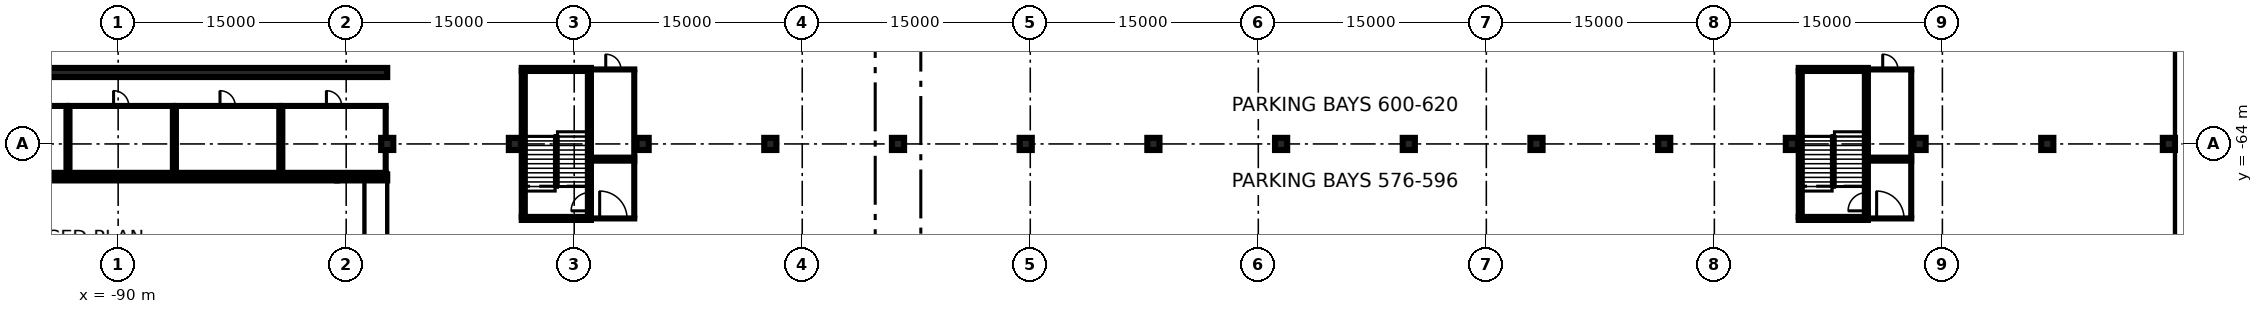
"""IFC4 building model, lengths in metres.
Left out: names, types, materials, properties, quantities, classifications, styles, units other than length and angle.
Written with IfcOpenShell. Run it as: python <this file> out.ifc"""

import sys

from ifc_helpers import new_model, si_unit, direction, frame, frame_2d, origin, origin_2d, place, context, subcontext, project, spatial, rectangle, extrude, element, fill, save


model = new_model("IFC4")
c1 = context("Model", 3, precision=1e-05, world=origin(), true_north=direction((0.0, 1.0)))
c2 = subcontext(c1, "Body", "Model", "MODEL_VIEW")
j1 = project(units=[si_unit("LENGTHUNIT", "METRE"), si_unit("PLANEANGLEUNIT", "RADIAN")], contexts=[c1])
p1 = place(None, origin())
s1 = spatial("IfcSite", under=j1, at=p1, CompositionType="ELEMENT")
p2 = place(p1, origin())
s2 = spatial("IfcBuilding", under=s1, at=p2, CompositionType="ELEMENT")
p3 = place(p2, frame((0.0, 0.0, -12.0)))
s3 = spatial("IfcBuildingStorey", under=s2, at=p3, CompositionType="ELEMENT", Elevation=-12.0)
p4 = place(p3, frame((45.75, -80.0, 0.0), z_axis=(0.0, 0.0, 1.0), x_axis=(0.0, 1.0, 0.0)))
e1 = element("IfcWall", 1, at=p4, inside=s3, PredefinedType="USERDEFINED", context=c2, shape_type="SweptSolid", body=[
    extrude(rectangle(XDim=160.0, YDim=0.9, at=frame_2d((80.0, 0.0))), origin(), (0.0, 0.0, 1.0), 11.55),
])
p5 = place(p2, frame((0.0, 0.0, -7.2)))
s4 = spatial("IfcBuildingStorey", under=s2, at=p5, CompositionType="ELEMENT", Elevation=-7.2)
for number, where, z_axis, x_axis in (
    (2, (-72.3, -64.0, -0.4), (0.0, 0.0, 1.0), (1.0, 0.0, 0.0)),
    (3, (-63.9, -64.0, -0.4), (0.0, 0.0, 1.0), (1.0, 0.0, 0.0)),
    (4, (-55.5, -64.0, -0.4), (0.0, 0.0, 1.0), (1.0, 0.0, 0.0)),
    (5, (-47.1, -64.0, -0.4), (0.0, 0.0, 1.0), (1.0, 0.0, 0.0)),
    (6, (-38.7, -64.0, -0.4), (0.0, 0.0, 1.0), (1.0, 0.0, 0.0)),
    (7, (-30.3, -64.0, -0.4), (0.0, 0.0, 1.0), (1.0, 0.0, 0.0)),
    (8, (-21.9, -64.0, -0.4), (0.0, 0.0, 1.0), (1.0, 0.0, 0.0)),
    (9, (-13.5, -64.0, -0.4), (0.0, 0.0, 1.0), (1.0, 0.0, 0.0)),
    (10, (-5.1, -64.0, -0.4), (0.0, 0.0, 1.0), (1.0, 0.0, 0.0)),
    (11, (3.3, -64.0, -0.4), (0.0, 0.0, 1.0), (1.0, 0.0, 0.0)),
    (12, (11.7, -64.0, -0.4), (0.0, 0.0, 1.0), (1.0, 0.0, 0.0)),
    (13, (20.1, -64.0, -0.4), (0.0, 0.0, 1.0), (1.0, 0.0, 0.0)),
    (14, (28.5, -64.0, -0.4), (0.0, 0.0, 1.0), (1.0, 0.0, 0.0)),
    (15, (36.9, -64.0, -0.4), (0.0, 0.0, 1.0), (1.0, 0.0, 0.0)),
    (16, (44.9, -64.0, -0.4), (0.0, 0.0, 1.0), (1.0, 0.0, 0.0)),
):
    element("IfcColumn", number, at=place(p5, frame(where, z_axis=z_axis, x_axis=x_axis)), inside=s4, PredefinedType="COLUMN", context=c2, shape_type="SweptSolid", body=[
        extrude(rectangle(XDim=0.8, YDim=0.8, at=origin_2d()), origin(), (0.0, 0.0, 1.0), 3.6),
    ])
p6 = place(p5, frame((-100.3, -65.9, 0.0), z_axis=(0.0, 0.0, 1.0), x_axis=(1.0, 0.0, 0.0)))
e17 = element("IfcWall", 17, at=p6, inside=s4, PredefinedType="PARTITIONING", context=c2, shape_type="SweptSolid", body=[
    extrude(rectangle(XDim=7.0, YDim=0.2, at=frame_2d((3.5, 0.0))), origin(), (0.0, 0.0, 1.0), 3.2),
])
p7 = place(p5, frame((-100.3, -61.5, 0.0), z_axis=(0.0, 0.0, 1.0), x_axis=(1.0, 0.0, 0.0)))
e18 = element("IfcWall", 18, at=p7, inside=s4, PredefinedType="PARTITIONING", context=c2, shape_type="SweptSolid", body=[
    extrude(rectangle(XDim=7.0, YDim=0.2, at=frame_2d((3.5, 0.0))), origin(), (0.0, 0.0, 1.0), 3.2),
])
p8 = place(p7, frame((2.6, 0.0, 0.0)))
e19 = element("IfcOpeningElement", 19, at=p8, cuts=e18, PredefinedType="OPENING", context=c2, shape_type="SweptSolid", body=[
    extrude(rectangle(XDim=1.8, YDim=2.1, at=frame_2d((0.9, 1.05))), frame((0.0, 0.11, 0.0), z_axis=(0.0, -1.0, 0.0), x_axis=(1.0, 0.0, 0.0)), (0.0, 0.0, 1.0), 0.22),
])
p9 = place(p5, frame((-93.4, -65.8, 0.0), z_axis=(0.0, 0.0, 1.0), x_axis=(0.0, 1.0, 0.0)))
e20 = element("IfcWall", 20, at=p9, inside=s4, PredefinedType="PARTITIONING", context=c2, shape_type="SweptSolid", body=[
    extrude(rectangle(XDim=4.2, YDim=0.2, at=frame_2d((2.1, 0.0))), origin(), (0.0, 0.0, 1.0), 3.2),
])
p10 = place(p5, frame((-93.3, -65.9, 0.0), z_axis=(0.0, 0.0, 1.0), x_axis=(1.0, 0.0, 0.0)))
e21 = element("IfcWall", 21, at=p10, inside=s4, PredefinedType="PARTITIONING", context=c2, shape_type="SweptSolid", body=[
    extrude(rectangle(XDim=7.0, YDim=0.2, at=frame_2d((3.5, 0.0))), origin(), (0.0, 0.0, 1.0), 3.2),
])
p11 = place(p5, frame((-93.3, -61.5, 0.0), z_axis=(0.0, 0.0, 1.0), x_axis=(1.0, 0.0, 0.0)))
e22 = element("IfcWall", 22, at=p11, inside=s4, PredefinedType="PARTITIONING", context=c2, shape_type="SweptSolid", body=[
    extrude(rectangle(XDim=7.0, YDim=0.2, at=frame_2d((3.5, 0.0))), origin(), (0.0, 0.0, 1.0), 3.2),
])
p12 = place(p11, frame((3.0, 0.0, 0.0)))
e23 = element("IfcOpeningElement", 23, at=p12, cuts=e22, PredefinedType="OPENING", context=c2, shape_type="SweptSolid", body=[
    extrude(rectangle(XDim=1.0, YDim=2.1, at=frame_2d((0.5, 1.05))), frame((0.0, 0.11, 0.0), z_axis=(0.0, -1.0, 0.0), x_axis=(1.0, 0.0, 0.0)), (0.0, 0.0, 1.0), 0.22),
])
for number, where, z_axis, x_axis in (
    (24, (-93.2, -65.8, 0.0), (0.0, 0.0, 1.0), (0.0, 1.0, 0.0)),
    (25, (-86.4, -65.8, 0.0), (0.0, 0.0, 1.0), (0.0, 1.0, 0.0)),
):
    element("IfcWall", number, at=place(p5, frame(where, z_axis=z_axis, x_axis=x_axis)), inside=s4, PredefinedType="PARTITIONING", context=c2, shape_type="SweptSolid", body=[
        extrude(rectangle(XDim=4.2, YDim=0.2, at=frame_2d((2.1, 0.0))), origin(), (0.0, 0.0, 1.0), 3.2),
    ])
p13 = place(p5, frame((-86.3, -65.9, 0.0), z_axis=(0.0, 0.0, 1.0), x_axis=(1.0, 0.0, 0.0)))
e26 = element("IfcWall", 26, at=p13, inside=s4, PredefinedType="PARTITIONING", context=c2, shape_type="SweptSolid", body=[
    extrude(rectangle(XDim=7.0, YDim=0.2, at=frame_2d((3.5, 0.0))), origin(), (0.0, 0.0, 1.0), 3.2),
])
p14 = place(p5, frame((-86.3, -61.5, 0.0), z_axis=(0.0, 0.0, 1.0), x_axis=(1.0, 0.0, 0.0)))
e27 = element("IfcWall", 27, at=p14, inside=s4, PredefinedType="PARTITIONING", context=c2, shape_type="SweptSolid", body=[
    extrude(rectangle(XDim=7.0, YDim=0.2, at=frame_2d((3.5, 0.0))), origin(), (0.0, 0.0, 1.0), 3.2),
])
p15 = place(p14, frame((3.0, 0.0, 0.0)))
e28 = element("IfcOpeningElement", 28, at=p15, cuts=e27, PredefinedType="OPENING", context=c2, shape_type="SweptSolid", body=[
    extrude(rectangle(XDim=1.0, YDim=2.1, at=frame_2d((0.5, 1.05))), frame((0.0, 0.11, 0.0), z_axis=(0.0, -1.0, 0.0), x_axis=(1.0, 0.0, 0.0)), (0.0, 0.0, 1.0), 0.22),
])
for number, where, z_axis, x_axis in (
    (29, (-86.2, -65.8, 0.0), (0.0, 0.0, 1.0), (0.0, 1.0, 0.0)),
    (30, (-79.4, -65.8, 0.0), (0.0, 0.0, 1.0), (0.0, 1.0, 0.0)),
):
    element("IfcWall", number, at=place(p5, frame(where, z_axis=z_axis, x_axis=x_axis)), inside=s4, PredefinedType="PARTITIONING", context=c2, shape_type="SweptSolid", body=[
        extrude(rectangle(XDim=4.2, YDim=0.2, at=frame_2d((2.1, 0.0))), origin(), (0.0, 0.0, 1.0), 3.2),
    ])
p16 = place(p5, frame((-79.3, -65.9, 0.0), z_axis=(0.0, 0.0, 1.0), x_axis=(1.0, 0.0, 0.0)))
e31 = element("IfcWall", 31, at=p16, inside=s4, PredefinedType="PARTITIONING", context=c2, shape_type="SweptSolid", body=[
    extrude(rectangle(XDim=7.0, YDim=0.2, at=frame_2d((3.5, 0.0))), origin(), (0.0, 0.0, 1.0), 3.2),
])
p17 = place(p5, frame((-79.3, -61.5, 0.0), z_axis=(0.0, 0.0, 1.0), x_axis=(1.0, 0.0, 0.0)))
e32 = element("IfcWall", 32, at=p17, inside=s4, PredefinedType="PARTITIONING", context=c2, shape_type="SweptSolid", body=[
    extrude(rectangle(XDim=7.0, YDim=0.2, at=frame_2d((3.5, 0.0))), origin(), (0.0, 0.0, 1.0), 3.2),
])
p18 = place(p17, frame((3.0, 0.0, 0.0)))
e33 = element("IfcOpeningElement", 33, at=p18, cuts=e32, PredefinedType="OPENING", context=c2, shape_type="SweptSolid", body=[
    extrude(rectangle(XDim=1.0, YDim=2.1, at=frame_2d((0.5, 1.05))), frame((0.0, 0.11, 0.0), z_axis=(0.0, -1.0, 0.0), x_axis=(1.0, 0.0, 0.0)), (0.0, 0.0, 1.0), 0.22),
])
p19 = place(p5, frame((-79.2, -65.8, 0.0), z_axis=(0.0, 0.0, 1.0), x_axis=(0.0, 1.0, 0.0)))
e34 = element("IfcWall", 34, at=p19, inside=s4, PredefinedType="PARTITIONING", context=c2, shape_type="SweptSolid", body=[
    extrude(rectangle(XDim=4.2, YDim=0.2, at=frame_2d((2.1, 0.0))), origin(), (0.0, 0.0, 1.0), 3.2),
])
p20 = place(p5, frame((-72.4, -65.8, 0.0), z_axis=(0.0, 0.0, 1.0), x_axis=(0.0, 1.0, 0.0)))
e35 = element("IfcWall", 35, at=p20, inside=s4, PredefinedType="PARTITIONING", context=c2, shape_type="SweptSolid", body=[
    extrude(rectangle(XDim=1.4, YDim=0.2, at=frame_2d((0.7, 0.0))), origin(), (0.0, 0.0, 1.0), 3.2),
])
p21 = place(p5, frame((-72.4, -63.6, 0.0), z_axis=(0.0, 0.0, 1.0), x_axis=(0.0, 1.0, 0.0)))
e36 = element("IfcWall", 36, at=p21, inside=s4, PredefinedType="PARTITIONING", context=c2, shape_type="SweptSolid", body=[
    extrude(rectangle(XDim=2.0, YDim=0.2, at=frame_2d((1.0, 0.0))), origin(), (0.0, 0.0, 1.0), 3.2),
])
p22 = place(p5, frame((-58.9, -68.9, 0.0), z_axis=(0.0, 0.0, 1.0), x_axis=(1.0, 0.0, 0.0)))
e37 = element("IfcWall", 37, at=p22, inside=s4, PredefinedType="PARTITIONING", context=c2, shape_type="SweptSolid", body=[
    extrude(rectangle(XDim=2.95, YDim=0.2, at=frame_2d((1.475, 0.0))), origin(), (0.0, 0.0, 1.0), 3.2),
])
p23 = place(p22, frame((0.575, 0.0, 0.0)))
e38 = element("IfcOpeningElement", 38, at=p23, cuts=e37, PredefinedType="OPENING", context=c2, shape_type="SweptSolid", body=[
    extrude(rectangle(XDim=1.8, YDim=2.1, at=frame_2d((0.9, 1.05))), frame((0.0, 0.11, 0.0), z_axis=(0.0, -1.0, 0.0), x_axis=(1.0, 0.0, 0.0)), (0.0, 0.0, 1.0), 0.22),
])
p24 = place(p5, frame((-58.9, -65.1, 0.0), z_axis=(0.0, 0.0, 1.0), x_axis=(1.0, 0.0, 0.0)))
e39 = element("IfcWall", 39, at=p24, inside=s4, PredefinedType="PARTITIONING", context=c2, shape_type="SweptSolid", body=[
    extrude(rectangle(XDim=2.95, YDim=0.2, at=frame_2d((1.475, 0.0))), origin(), (0.0, 0.0, 1.0), 3.2),
])
p25 = place(p5, frame((-56.05, -68.8, 0.0), z_axis=(0.0, 0.0, 1.0), x_axis=(0.0, 1.0, 0.0)))
e40 = element("IfcWall", 40, at=p25, inside=s4, PredefinedType="PARTITIONING", context=c2, shape_type="SweptSolid", body=[
    extrude(rectangle(XDim=3.6, YDim=0.2, at=frame_2d((1.8, 0.0))), origin(), (0.0, 0.0, 1.0), 3.2),
])
p26 = place(p5, frame((-58.9, -64.9, 0.0), z_axis=(0.0, 0.0, 1.0), x_axis=(1.0, 0.0, 0.0)))
e41 = element("IfcWall", 41, at=p26, inside=s4, PredefinedType="PARTITIONING", context=c2, shape_type="SweptSolid", body=[
    extrude(rectangle(XDim=2.95, YDim=0.2, at=frame_2d((1.475, 0.0))), origin(), (0.0, 0.0, 1.0), 3.2),
])
p27 = place(p5, frame((-58.9, -59.1, 0.0), z_axis=(0.0, 0.0, 1.0), x_axis=(1.0, 0.0, 0.0)))
e42 = element("IfcWall", 42, at=p27, inside=s4, PredefinedType="PARTITIONING", context=c2, shape_type="SweptSolid", body=[
    extrude(rectangle(XDim=2.95, YDim=0.2, at=frame_2d((1.475, 0.0))), origin(), (0.0, 0.0, 1.0), 3.2),
])
p28 = place(p27, frame((0.975, 0.0, 0.0)))
e43 = element("IfcOpeningElement", 43, at=p28, cuts=e42, PredefinedType="OPENING", context=c2, shape_type="SweptSolid", body=[
    extrude(rectangle(XDim=1.0, YDim=2.1, at=frame_2d((0.5, 1.05))), frame((0.0, 0.11, 0.0), z_axis=(0.0, -1.0, 0.0), x_axis=(1.0, 0.0, 0.0)), (0.0, 0.0, 1.0), 0.22),
])
p29 = place(p5, frame((-56.05, -64.8, 0.0), z_axis=(0.0, 0.0, 1.0), x_axis=(0.0, 1.0, 0.0)))
e44 = element("IfcWall", 44, at=p29, inside=s4, PredefinedType="PARTITIONING", context=c2, shape_type="SweptSolid", body=[
    extrude(rectangle(XDim=5.6, YDim=0.2, at=frame_2d((2.8, 0.0))), origin(), (0.0, 0.0, 1.0), 3.2),
])
p30 = place(p5, frame((25.1, -68.9, 0.0), z_axis=(0.0, 0.0, 1.0), x_axis=(1.0, 0.0, 0.0)))
e45 = element("IfcWall", 45, at=p30, inside=s4, PredefinedType="PARTITIONING", context=c2, shape_type="SweptSolid", body=[
    extrude(rectangle(XDim=2.95, YDim=0.2, at=frame_2d((1.475, 0.0))), origin(), (0.0, 0.0, 1.0), 3.2),
])
p31 = place(p30, frame((0.575, 0.0, 0.0)))
e46 = element("IfcOpeningElement", 46, at=p31, cuts=e45, PredefinedType="OPENING", context=c2, shape_type="SweptSolid", body=[
    extrude(rectangle(XDim=1.8, YDim=2.1, at=frame_2d((0.9, 1.05))), frame((0.0, 0.11, 0.0), z_axis=(0.0, -1.0, 0.0), x_axis=(1.0, 0.0, 0.0)), (0.0, 0.0, 1.0), 0.22),
])
p32 = place(p5, frame((25.1, -65.1, 0.0), z_axis=(0.0, 0.0, 1.0), x_axis=(1.0, 0.0, 0.0)))
e47 = element("IfcWall", 47, at=p32, inside=s4, PredefinedType="PARTITIONING", context=c2, shape_type="SweptSolid", body=[
    extrude(rectangle(XDim=2.95, YDim=0.2, at=frame_2d((1.475, 0.0))), origin(), (0.0, 0.0, 1.0), 3.2),
])
p33 = place(p5, frame((27.95, -68.8, 0.0), z_axis=(0.0, 0.0, 1.0), x_axis=(0.0, 1.0, 0.0)))
e48 = element("IfcWall", 48, at=p33, inside=s4, PredefinedType="PARTITIONING", context=c2, shape_type="SweptSolid", body=[
    extrude(rectangle(XDim=3.6, YDim=0.2, at=frame_2d((1.8, 0.0))), origin(), (0.0, 0.0, 1.0), 3.2),
])
p34 = place(p5, frame((25.1, -64.9, 0.0), z_axis=(0.0, 0.0, 1.0), x_axis=(1.0, 0.0, 0.0)))
e49 = element("IfcWall", 49, at=p34, inside=s4, PredefinedType="PARTITIONING", context=c2, shape_type="SweptSolid", body=[
    extrude(rectangle(XDim=2.95, YDim=0.2, at=frame_2d((1.475, 0.0))), origin(), (0.0, 0.0, 1.0), 3.2),
])
p35 = place(p5, frame((25.1, -59.1, 0.0), z_axis=(0.0, 0.0, 1.0), x_axis=(1.0, 0.0, 0.0)))
e50 = element("IfcWall", 50, at=p35, inside=s4, PredefinedType="PARTITIONING", context=c2, shape_type="SweptSolid", body=[
    extrude(rectangle(XDim=2.95, YDim=0.2, at=frame_2d((1.475, 0.0))), origin(), (0.0, 0.0, 1.0), 3.2),
])
p36 = place(p35, frame((0.975, 0.0, 0.0)))
e51 = element("IfcOpeningElement", 51, at=p36, cuts=e50, PredefinedType="OPENING", context=c2, shape_type="SweptSolid", body=[
    extrude(rectangle(XDim=1.0, YDim=2.1, at=frame_2d((0.5, 1.05))), frame((0.0, 0.11, 0.0), z_axis=(0.0, -1.0, 0.0), x_axis=(1.0, 0.0, 0.0)), (0.0, 0.0, 1.0), 0.22),
])
p37 = place(p5, frame((27.95, -64.8, 0.0), z_axis=(0.0, 0.0, 1.0), x_axis=(0.0, 1.0, 0.0)))
e52 = element("IfcWall", 52, at=p37, inside=s4, PredefinedType="PARTITIONING", context=c2, shape_type="SweptSolid", body=[
    extrude(rectangle(XDim=5.6, YDim=0.2, at=frame_2d((2.8, 0.0))), origin(), (0.0, 0.0, 1.0), 3.2),
])
p38 = place(p5, frame((-63.35, -68.8, 0.0), z_axis=(0.0, 0.0, 1.0), x_axis=(0.0, 1.0, 0.0)))
e53 = element("IfcWall", 53, at=p38, inside=s4, PredefinedType="SOLIDWALL", context=c2, shape_type="SweptSolid", body=[
    extrude(rectangle(XDim=9.6, YDim=0.2, at=frame_2d((4.8, 0.0))), origin(), (0.0, 0.0, 1.0), 3.2),
])
p39 = place(p5, frame((-59.0, -68.8, 0.0), z_axis=(0.0, 0.0, 1.0), x_axis=(0.0, 1.0, 0.0)))
e54 = element("IfcWall", 54, at=p39, inside=s4, PredefinedType="SOLIDWALL", context=c2, shape_type="SweptSolid", body=[
    extrude(rectangle(XDim=9.6, YDim=0.2, at=frame_2d((4.8, 0.0))), origin(), (0.0, 0.0, 1.0), 3.2),
])
p40 = place(p39, frame((0.4, 0.0, 0.0)))
e55 = element("IfcOpeningElement", 55, at=p40, cuts=e54, PredefinedType="OPENING", context=c2, shape_type="SweptSolid", body=[
    extrude(rectangle(XDim=1.2, YDim=2.1, at=frame_2d((0.6, 1.05))), frame((0.0, 0.11, 0.0), z_axis=(0.0, -1.0, 0.0), x_axis=(1.0, 0.0, 0.0)), (0.0, 0.0, 1.0), 0.22),
])
for number, where, z_axis, x_axis in (
    (56, (-58.9, -68.9, 0.0), (0.0, 0.0, 1.0), (-1.0, 0.0, 0.0)),
    (57, (-63.45, -59.1, 0.0), (0.0, 0.0, 1.0), (1.0, 0.0, 0.0)),
):
    element("IfcWall", number, at=place(p5, frame(where, z_axis=z_axis, x_axis=x_axis)), inside=s4, PredefinedType="SOLIDWALL", context=c2, shape_type="SweptSolid", body=[
        extrude(rectangle(XDim=4.55, YDim=0.2, at=frame_2d((2.275, 0.0))), origin(), (0.0, 0.0, 1.0), 3.2),
    ])
p41 = place(p5, frame((20.65, -68.8, 0.0), z_axis=(0.0, 0.0, 1.0), x_axis=(0.0, 1.0, 0.0)))
e58 = element("IfcWall", 58, at=p41, inside=s4, PredefinedType="SOLIDWALL", context=c2, shape_type="SweptSolid", body=[
    extrude(rectangle(XDim=9.6, YDim=0.2, at=frame_2d((4.8, 0.0))), origin(), (0.0, 0.0, 1.0), 3.2),
])
p42 = place(p5, frame((25.0, -68.8, 0.0), z_axis=(0.0, 0.0, 1.0), x_axis=(0.0, 1.0, 0.0)))
e59 = element("IfcWall", 59, at=p42, inside=s4, PredefinedType="SOLIDWALL", context=c2, shape_type="SweptSolid", body=[
    extrude(rectangle(XDim=9.6, YDim=0.2, at=frame_2d((4.8, 0.0))), origin(), (0.0, 0.0, 1.0), 3.2),
])
p43 = place(p42, frame((0.4, 0.0, 0.0)))
e60 = element("IfcOpeningElement", 60, at=p43, cuts=e59, PredefinedType="OPENING", context=c2, shape_type="SweptSolid", body=[
    extrude(rectangle(XDim=1.2, YDim=2.1, at=frame_2d((0.6, 1.05))), frame((0.0, 0.11, 0.0), z_axis=(0.0, -1.0, 0.0), x_axis=(1.0, 0.0, 0.0)), (0.0, 0.0, 1.0), 0.22),
])
for number, where, z_axis, x_axis in (
    (61, (25.1, -68.9, 0.0), (0.0, 0.0, 1.0), (-1.0, 0.0, 0.0)),
    (62, (20.55, -59.1, 0.0), (0.0, 0.0, 1.0), (1.0, 0.0, 0.0)),
):
    element("IfcWall", number, at=place(p5, frame(where, z_axis=z_axis, x_axis=x_axis)), inside=s4, PredefinedType="SOLIDWALL", context=c2, shape_type="SweptSolid", body=[
        extrude(rectangle(XDim=4.55, YDim=0.2, at=frame_2d((2.275, 0.0))), origin(), (0.0, 0.0, 1.0), 3.2),
    ])
p44 = place(p5, frame((-114.3, -66.2, 0.0), z_axis=(0.0, 0.0, 1.0), x_axis=(1.0, 0.0, 0.0)))
e63 = element("IfcWall", 63, at=p44, inside=s4, PredefinedType="SOLIDWALL", context=c2, shape_type="SweptSolid", body=[
    extrude(rectangle(XDim=38.7, YDim=0.4, at=frame_2d((19.35, 0.0))), origin(), (0.0, 0.0, 1.0), 3.2),
])
p45 = place(p5, frame((-75.6, -66.2, 0.0), z_axis=(0.0, 0.0, 1.0), x_axis=(1.0, 0.0, 0.0)))
e64 = element("IfcWall", 64, at=p45, inside=s4, PredefinedType="SOLIDWALL", context=c2, shape_type="SweptSolid", body=[
    extrude(rectangle(XDim=3.3, YDim=0.4, at=frame_2d((1.65, 0.0))), origin(), (0.0, 0.0, 1.0), 3.2),
])
p46 = place(p5, frame((-114.3, -59.3, 0.0), z_axis=(0.0, 0.0, 1.0), x_axis=(1.0, 0.0, 0.0)))
e65 = element("IfcWall", 65, at=p46, inside=s4, PredefinedType="SOLIDWALL", context=c2, shape_type="SweptSolid", body=[
    extrude(rectangle(XDim=42.0, YDim=0.6, at=frame_2d((21.0, 0.0))), origin(), (0.0, 0.0, 1.0), 3.2),
])
p47 = place(p12, origin())
e66 = element("IfcDoor", 66, at=p47, inside=s4, OperationType="SINGLE_SWING_LEFT", PredefinedType="DOOR", context=c2, shape_type="SweptSolid", body=[
    extrude(rectangle(XDim=1.0, YDim=2.1, at=frame_2d((0.5, 1.05))), frame((0.0, 0.025, 0.0), z_axis=(0.0, -1.0, 0.0), x_axis=(1.0, 0.0, 0.0)), (0.0, 0.0, 1.0), 0.05),
])
fill(e23, e66)
p48 = place(p15, origin())
e67 = element("IfcDoor", 67, at=p48, inside=s4, OperationType="SINGLE_SWING_LEFT", PredefinedType="DOOR", context=c2, shape_type="SweptSolid", body=[
    extrude(rectangle(XDim=1.0, YDim=2.1, at=frame_2d((0.5, 1.05))), frame((0.0, 0.025, 0.0), z_axis=(0.0, -1.0, 0.0), x_axis=(1.0, 0.0, 0.0)), (0.0, 0.0, 1.0), 0.05),
])
fill(e28, e67)
p49 = place(p18, origin())
e68 = element("IfcDoor", 68, at=p49, inside=s4, OperationType="SINGLE_SWING_LEFT", PredefinedType="DOOR", context=c2, shape_type="SweptSolid", body=[
    extrude(rectangle(XDim=1.0, YDim=2.1, at=frame_2d((0.5, 1.05))), frame((0.0, 0.025, 0.0), z_axis=(0.0, -1.0, 0.0), x_axis=(1.0, 0.0, 0.0)), (0.0, 0.0, 1.0), 0.05),
])
fill(e33, e68)
p50 = place(p23, origin())
e69 = element("IfcDoor", 69, at=p50, inside=s4, OperationType="DOUBLE_DOOR_SINGLE_SWING", PredefinedType="DOOR", context=c2, shape_type="SweptSolid", body=[
    extrude(rectangle(XDim=1.8, YDim=2.1, at=frame_2d((0.9, 1.05))), frame((0.0, 0.025, 0.0), z_axis=(0.0, -1.0, 0.0), x_axis=(1.0, 0.0, 0.0)), (0.0, 0.0, 1.0), 0.05),
])
fill(e38, e69)
p51 = place(p28, origin())
e70 = element("IfcDoor", 70, at=p51, inside=s4, OperationType="SINGLE_SWING_LEFT", PredefinedType="DOOR", context=c2, shape_type="SweptSolid", body=[
    extrude(rectangle(XDim=1.0, YDim=2.1, at=frame_2d((0.5, 1.05))), frame((0.0, 0.025, 0.0), z_axis=(0.0, -1.0, 0.0), x_axis=(1.0, 0.0, 0.0)), (0.0, 0.0, 1.0), 0.05),
])
fill(e43, e70)
p52 = place(p31, origin())
e71 = element("IfcDoor", 71, at=p52, inside=s4, OperationType="DOUBLE_DOOR_SINGLE_SWING", PredefinedType="DOOR", context=c2, shape_type="SweptSolid", body=[
    extrude(rectangle(XDim=1.8, YDim=2.1, at=frame_2d((0.9, 1.05))), frame((0.0, 0.025, 0.0), z_axis=(0.0, -1.0, 0.0), x_axis=(1.0, 0.0, 0.0)), (0.0, 0.0, 1.0), 0.05),
])
fill(e46, e71)
p53 = place(p36, origin())
e72 = element("IfcDoor", 72, at=p53, inside=s4, OperationType="SINGLE_SWING_LEFT", PredefinedType="DOOR", context=c2, shape_type="SweptSolid", body=[
    extrude(rectangle(XDim=1.0, YDim=2.1, at=frame_2d((0.5, 1.05))), frame((0.0, 0.025, 0.0), z_axis=(0.0, -1.0, 0.0), x_axis=(1.0, 0.0, 0.0)), (0.0, 0.0, 1.0), 0.05),
])
fill(e51, e72)
p54 = place(p40, origin())
e73 = element("IfcDoor", 73, at=p54, inside=s4, OperationType="SINGLE_SWING_LEFT", PredefinedType="DOOR", context=c2, shape_type="SweptSolid", body=[
    extrude(rectangle(XDim=1.2, YDim=2.1, at=frame_2d((0.6, 1.05))), frame((0.0, 0.025, 0.0), z_axis=(0.0, -1.0, 0.0), x_axis=(1.0, 0.0, 0.0)), (0.0, 0.0, 1.0), 0.05),
])
fill(e55, e73)
p55 = place(p43, origin())
e74 = element("IfcDoor", 74, at=p55, inside=s4, OperationType="SINGLE_SWING_LEFT", PredefinedType="DOOR", context=c2, shape_type="SweptSolid", body=[
    extrude(rectangle(XDim=1.2, YDim=2.1, at=frame_2d((0.6, 1.05))), frame((0.0, 0.025, 0.0), z_axis=(0.0, -1.0, 0.0), x_axis=(1.0, 0.0, 0.0)), (0.0, 0.0, 1.0), 0.05),
])
fill(e60, e74)
save(model, sys.argv[1])
